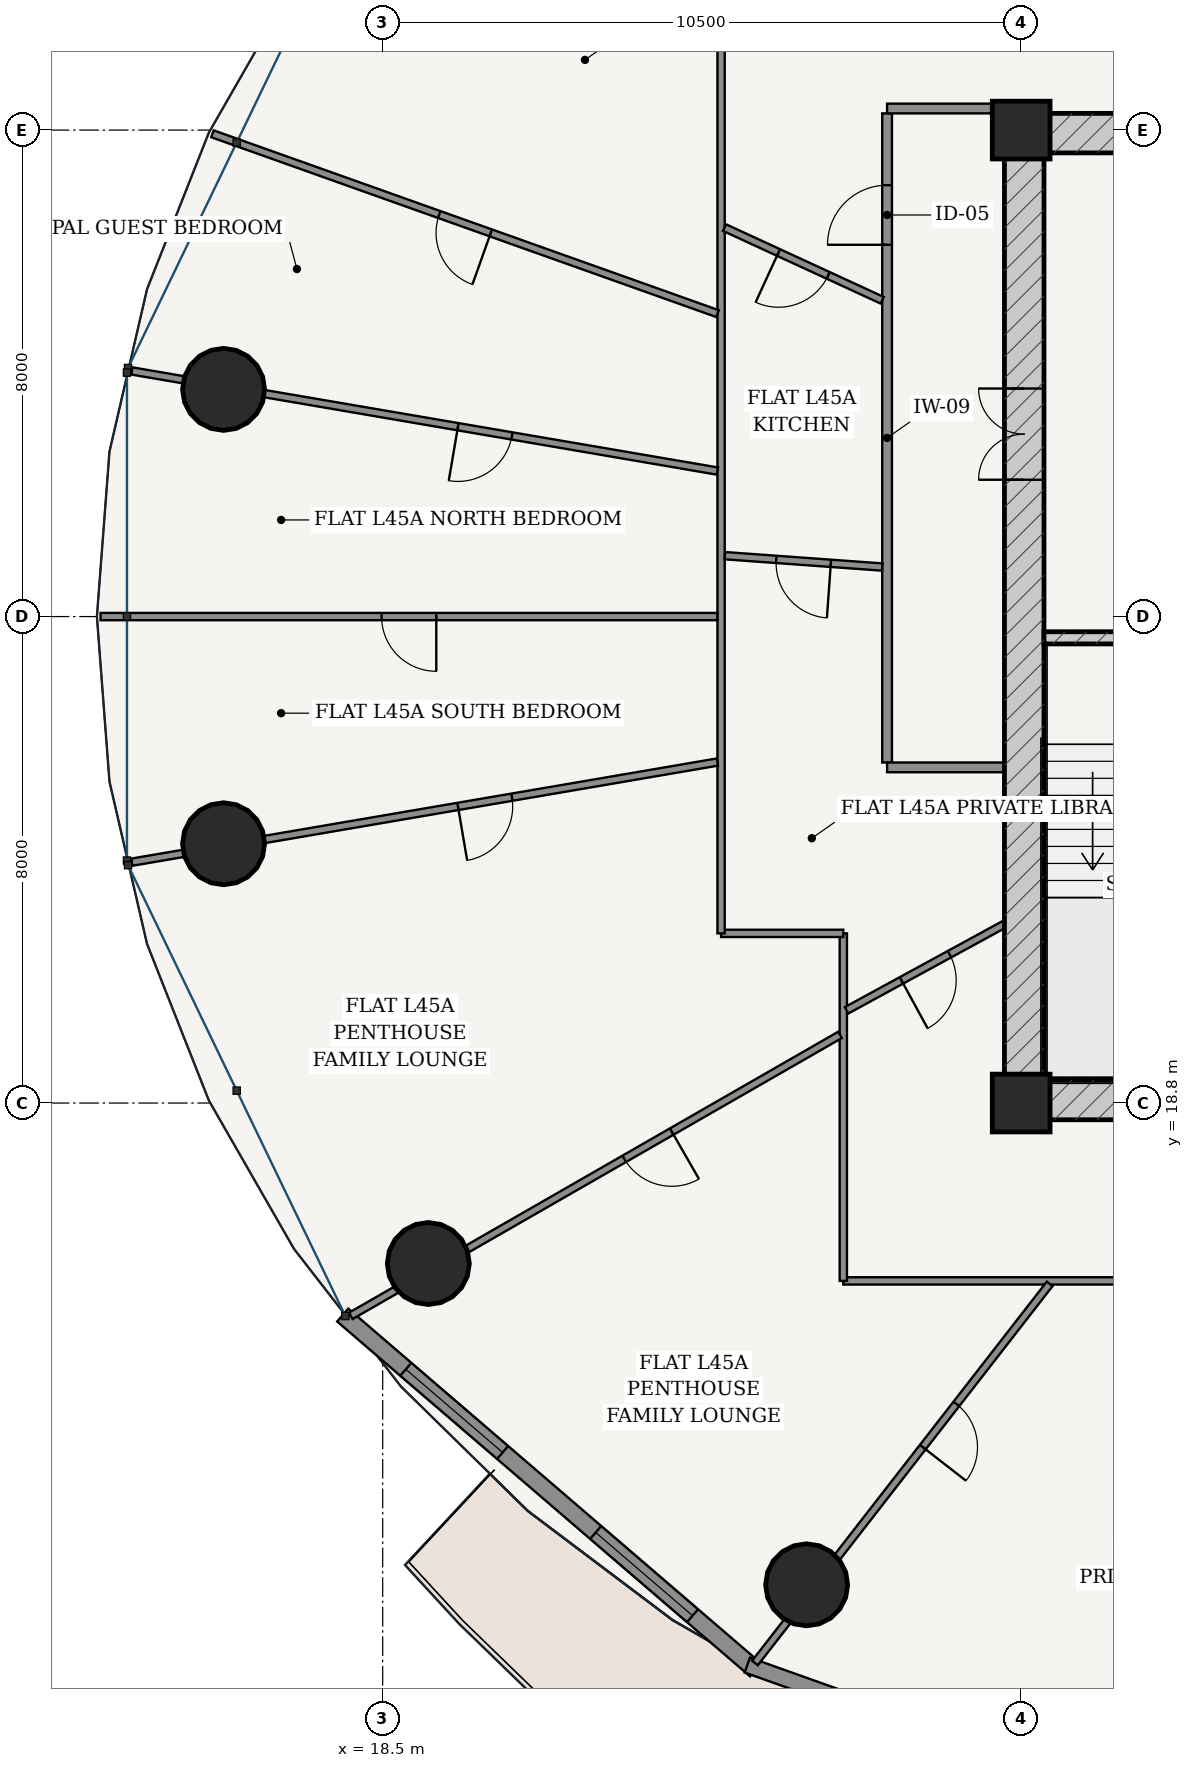
"""IFC4 building model, lengths in metres.
Left out: names, types, materials, properties, quantities, classifications, styles, units other than length and angle.
Written with IfcOpenShell. Run it as: python <this file> out.ifc"""

import sys

from ifc_helpers import new_model, si_unit, direction, frame, frame_2d, origin, origin_2d, place, context, subcontext, project, spatial, rectangle, hollow_circle, extrude, source, transform, mapped, element, fill, save


model = new_model("IFC4")
c1 = context("Model", 3, precision=1e-05, world=origin(), true_north=direction((-0.2419218956, 0.970295726276)))
c2 = subcontext(c1, "Body", "Model", "MODEL_VIEW")
j1 = project(units=[si_unit("LENGTHUNIT", "METRE"), si_unit("PLANEANGLEUNIT", "RADIAN")], contexts=[c1])
p1 = place(None, origin())
s1 = spatial("IfcSite", under=j1, at=p1, CompositionType="ELEMENT")
p2 = place(p1, origin())
s2 = spatial("IfcBuilding", under=s1, at=p2, CompositionType="ELEMENT")
p3 = place(p2, frame((0.0, 0.0, 171.4)))
s3 = spatial("IfcBuildingStorey", under=s2, at=p3, CompositionType="ELEMENT", Elevation=171.4)
for number, where, z_axis, x_axis in (
    (1, (29.0, 18.8, 0.0), (0.0, 0.0, 1.0), (1.0, 0.0, 0.0)),
    (2, (29.0, 34.8, 0.0), (0.0, 0.0, 1.0), (1.0, 0.0, 0.0)),
):
    element("IfcColumn", number, at=place(p3, frame(where, z_axis=z_axis, x_axis=x_axis)), inside=s3, PredefinedType="COLUMN", context=c2, shape_type="SweptSolid", body=[
        extrude(rectangle(XDim=0.95, YDim=0.95, at=origin_2d()), origin(), (0.0, 0.0, 1.0), 3.6),
    ])
p4 = place(p3, frame((28.725, 18.85, 0.0), z_axis=(0.0, 0.0, 1.0), x_axis=(1.0, 0.0, 0.0)))
e3 = element("IfcWall", 3, at=p4, inside=s3, PredefinedType="SHEAR", context=c2, shape_type="SweptSolid", body=[
    extrude(rectangle(XDim=18.55, YDim=0.65, at=frame_2d((9.275, 0.0))), origin(), (0.0, 0.0, 1.0), 3.33),
])
p5 = place(p4, frame((6.81, 0.0, 0.0)))
e4 = element("IfcOpeningElement", 4, at=p5, cuts=e3, PredefinedType="OPENING", context=c2, shape_type="SweptSolid", body=[
    extrude(rectangle(XDim=0.85, YDim=2.1, at=frame_2d((0.425, 1.05))), frame((0.0, 0.335, 0.0), z_axis=(0.0, -1.0, 0.0), x_axis=(1.0, 0.0, 0.0)), (0.0, 0.0, 1.0), 0.67),
])
p6 = place(p4, frame((8.85, 0.0, 0.0)))
e5 = element("IfcOpeningElement", 5, at=p6, cuts=e3, PredefinedType="OPENING", context=c2, shape_type="SweptSolid", body=[
    extrude(rectangle(XDim=0.85, YDim=2.1, at=frame_2d((0.425, 1.05))), frame((0.0, 0.335, 0.0), z_axis=(0.0, -1.0, 0.0), x_axis=(1.0, 0.0, 0.0)), (0.0, 0.0, 1.0), 0.67),
])
p7 = place(p4, frame((10.89, 0.0, 0.0)))
e6 = element("IfcOpeningElement", 6, at=p7, cuts=e3, PredefinedType="OPENING", context=c2, shape_type="SweptSolid", body=[
    extrude(rectangle(XDim=0.85, YDim=2.1, at=frame_2d((0.425, 1.05))), frame((0.0, 0.335, 0.0), z_axis=(0.0, -1.0, 0.0), x_axis=(1.0, 0.0, 0.0)), (0.0, 0.0, 1.0), 0.67),
])
p8 = place(p3, frame((28.725, 34.75, 0.0), z_axis=(0.0, 0.0, 1.0), x_axis=(1.0, 0.0, 0.0)))
e7 = element("IfcWall", 7, at=p8, inside=s3, PredefinedType="SHEAR", context=c2, shape_type="SweptSolid", body=[
    extrude(rectangle(XDim=18.55, YDim=0.65, at=frame_2d((9.275, 0.0))), origin(), (0.0, 0.0, 1.0), 3.33),
])
p9 = place(p3, frame((29.05, 19.175, 0.0), z_axis=(0.0, 0.0, 1.0), x_axis=(0.0, 1.0, 0.0)))
e8 = element("IfcWall", 8, at=p9, inside=s3, PredefinedType="SHEAR", context=c2, shape_type="SweptSolid", body=[
    extrude(rectangle(XDim=15.25, YDim=0.65, at=frame_2d((7.625, 0.0))), origin(), (0.0, 0.0, 1.0), 3.33),
])
p10 = place(p9, frame((9.875, 0.0, 0.0)))
e9 = element("IfcOpeningElement", 9, at=p10, cuts=e8, PredefinedType="OPENING", context=c2, shape_type="SweptSolid", body=[
    extrude(rectangle(XDim=1.5, YDim=2.2, at=frame_2d((0.75, 1.1))), frame((0.0, 0.335, 0.0), z_axis=(0.0, -1.0, 0.0), x_axis=(1.0, 0.0, 0.0)), (0.0, 0.0, 1.0), 0.67),
])
p11 = place(p3, frame((29.375, 26.45, 0.0), z_axis=(0.0, 0.0, 1.0), x_axis=(1.0, 0.0, 0.0)))
e10 = element("IfcWall", 10, at=p11, inside=s3, PredefinedType="SOLIDWALL", context=c2, shape_type="SweptSolid", body=[
    extrude(rectangle(XDim=3.32, YDim=0.2, at=frame_2d((1.66, 0.0))), origin(), (0.0, 0.0, 1.0), 3.33),
])
p12 = place(p11, frame((1.185, 0.0, 0.0)))
e11 = element("IfcOpeningElement", 11, at=p12, cuts=e10, PredefinedType="OPENING", context=c2, shape_type="SweptSolid", body=[
    extrude(rectangle(XDim=0.95, YDim=2.15, at=frame_2d((0.475, 1.075))), frame((0.0, 0.11, 0.0), z_axis=(0.0, -1.0, 0.0), x_axis=(1.0, 0.0, 0.0)), (0.0, 0.0, 1.0), 0.22),
])
for number, where, z_axis, x_axis in (
    (12, (15.883, 30.536, 0.0), (0.0, 0.0, 1.0), (1.0, 0.0, 0.0)),
    (13, (15.883, 23.064, 0.0), (0.0, 0.0, 1.0), (1.0, 0.0, 0.0)),
    (14, (19.25, 16.161, 0.0), (0.0, 0.0, 1.0), (1.0, 0.0, 0.0)),
    (15, (25.472, 10.877, 0.0), (0.0, 0.0, 1.0), (1.0, 0.0, 0.0)),
):
    element("IfcColumn", number, at=place(p3, frame(where, z_axis=z_axis, x_axis=x_axis)), inside=s3, PredefinedType="COLUMN", context=c2, shape_type="SweptSolid", body=[
        extrude(hollow_circle(Radius=0.675, WallThickness=0.042, at=origin_2d()), origin(), (0.0, 0.0, 1.0), 3.6),
    ])
p13 = place(p3, frame((17.843, 15.313, 0.0), z_axis=(0.0, 0.0, 1.0), x_axis=(0.75843401647, -0.651749831348, 0.0)))
e16 = element("IfcWall", 16, at=p13, inside=s3, PredefinedType="SOLIDWALL", context=c2, shape_type="SweptSolid", body=[
    extrude(rectangle(XDim=8.952, YDim=0.28, at=frame_2d((4.476, 0.0))), origin(), (0.0, 0.0, 1.0), 3.33),
])
p14 = place(p13, frame((1.367, 0.0, 0.85)))
e17 = element("IfcOpeningElement", 17, at=p14, cuts=e16, PredefinedType="OPENING", context=c2, shape_type="SweptSolid", body=[
    extrude(rectangle(XDim=2.1, YDim=1.95, at=frame_2d((1.05, 0.975))), frame((0.0, 0.15, 0.0), z_axis=(0.0, -1.0, 0.0), x_axis=(1.0, 0.0, 0.0)), (0.0, 0.0, 1.0), 0.3),
])
p15 = place(p13, frame((5.485, 0.0, 0.85)))
e18 = element("IfcOpeningElement", 18, at=p15, cuts=e16, PredefinedType="OPENING", context=c2, shape_type="SweptSolid", body=[
    extrude(rectangle(XDim=2.1, YDim=1.95, at=frame_2d((1.05, 0.975))), frame((0.0, 0.15, 0.0), z_axis=(0.0, -1.0, 0.0), x_axis=(1.0, 0.0, 0.0)), (0.0, 0.0, 1.0), 0.3),
])
p16 = place(p3, frame((24.497, 9.557, 0.0), z_axis=(0.0, 0.0, 1.0), x_axis=(0.942103604331, -0.335321932934, 0.0)))
e19 = element("IfcWall", 19, at=p16, inside=s3, PredefinedType="SOLIDWALL", context=c2, shape_type="SweptSolid", body=[
    extrude(rectangle(XDim=9.408, YDim=0.26, at=frame_2d((4.704, 0.0))), origin(), (0.0, 0.0, 1.0), 3.33),
])
p17 = place(p16, frame((4.029, 0.0, 0.0)))
e20 = element("IfcOpeningElement", 20, at=p17, cuts=e19, PredefinedType="OPENING", context=c2, shape_type="SweptSolid", body=[
    extrude(rectangle(XDim=1.35, YDim=2.2, at=frame_2d((0.675, 1.1))), frame((0.0, 0.14, 0.0), z_axis=(0.0, -1.0, 0.0), x_axis=(1.0, 0.0, 0.0)), (0.0, 0.0, 1.0), 0.28),
])
p18 = place(p3, frame((26.795, 24.4, 0.0), z_axis=(0.0, 0.0, 1.0), x_axis=(0.0, 1.0, 0.0)))
e21 = element("IfcWall", 21, at=p18, inside=s3, PredefinedType="PARTITIONING", context=c2, shape_type="SweptSolid", body=[
    extrude(rectangle(XDim=10.675, YDim=0.16, at=frame_2d((5.337, 0.0))), origin(), (0.0, 0.0, 1.0), 2.776),
])
p19 = place(p18, frame((8.514, 0.0, 0.0)))
e22 = element("IfcOpeningElement", 22, at=p19, cuts=e21, PredefinedType="OPENING", context=c2, shape_type="SweptSolid", body=[
    extrude(rectangle(XDim=0.98, YDim=2.2, at=frame_2d((0.49, 1.1))), frame((0.0, 0.09, 0.0), z_axis=(0.0, -1.0, 0.0), x_axis=(1.0, 0.0, 0.0)), (0.0, 0.0, 1.0), 0.18),
])
p20 = place(p3, frame((26.795, 35.155, 0.0), z_axis=(0.0, 0.0, 1.0), x_axis=(1.0, 0.0, 0.0)))
e23 = element("IfcWall", 23, at=p20, inside=s3, PredefinedType="PARTITIONING", context=c2, shape_type="SweptSolid", body=[
    extrude(rectangle(XDim=1.93, YDim=0.16, at=frame_2d((0.965, 0.0))), origin(), (0.0, 0.0, 1.0), 2.776),
])
p21 = place(p3, frame((26.795, 24.32, 0.0), z_axis=(0.0, 0.0, 1.0), x_axis=(1.0, 0.0, 0.0)))
e24 = element("IfcWall", 24, at=p21, inside=s3, PredefinedType="PARTITIONING", context=c2, shape_type="SweptSolid", body=[
    extrude(rectangle(XDim=1.93, YDim=0.16, at=frame_2d((0.965, 0.0))), origin(), (0.0, 0.0, 1.0), 3.33),
])
p22 = place(p3, frame((31.59, 15.875, 0.0), z_axis=(0.0, 0.0, 1.0), x_axis=(-1.0, 0.0, 0.0)))
e25 = element("IfcWall", 25, at=p22, inside=s3, PredefinedType="PARTITIONING", context=c2, shape_type="SweptSolid", body=[
    extrude(rectangle(XDim=5.515, YDim=0.12, at=frame_2d((2.758, 0.0))), origin(), (0.0, 0.0, 1.0), 2.776),
])
p23 = place(p3, frame((26.075, 15.875, 0.0), z_axis=(0.0, 0.0, 1.0), x_axis=(0.0, 1.0, 0.0)))
e26 = element("IfcWall", 26, at=p23, inside=s3, PredefinedType="PARTITIONING", context=c2, shape_type="SweptSolid", body=[
    extrude(rectangle(XDim=5.715, YDim=0.12, at=frame_2d((2.857, 0.0))), origin(), (0.0, 0.0, 1.0), 2.776),
])
p24 = place(p3, frame((26.075, 21.59, 0.0), z_axis=(0.0, 0.0, 1.0), x_axis=(-1.0, 0.0, 0.0)))
e27 = element("IfcWall", 27, at=p24, inside=s3, PredefinedType="PARTITIONING", context=c2, shape_type="SweptSolid", body=[
    extrude(rectangle(XDim=2.01, YDim=0.12, at=frame_2d((1.005, 0.0))), origin(), (0.0, 0.0, 1.0), 3.33),
])
p25 = place(p3, frame((24.065, 21.59, 0.0), z_axis=(0.0, 0.0, 1.0), x_axis=(0.0, 1.0, 0.0)))
e28 = element("IfcWall", 28, at=p25, inside=s3, PredefinedType="PARTITIONING", context=c2, shape_type="SweptSolid", body=[
    extrude(rectangle(XDim=16.295, YDim=0.12, at=frame_2d((8.147, 0.0))), origin(), (0.0, 0.0, 1.0), 2.776),
])
p26 = place(p3, frame((24.007, 31.782, 0.0), z_axis=(0.0, 0.0, 1.0), x_axis=(-0.942077868165, 0.335394231187, 0.0)))
e29 = element("IfcWall", 29, at=p26, inside=s3, PredefinedType="PARTITIONING", context=c2, shape_type="SweptSolid", body=[
    extrude(rectangle(XDim=8.817, YDim=0.12, at=frame_2d((4.408, 0.0))), origin(), (0.0, 0.0, 1.0), 2.846),
])
p27 = place(p26, frame((3.958, 0.0, 0.0)))
e30 = element("IfcOpeningElement", 30, at=p27, cuts=e29, PredefinedType="OPENING", context=c2, shape_type="SweptSolid", body=[
    extrude(rectangle(XDim=0.9, YDim=2.15, at=frame_2d((0.45, 1.075))), frame((0.0, 0.07, 0.0), z_axis=(0.0, -1.0, 0.0), x_axis=(1.0, 0.0, 0.0)), (0.0, 0.0, 1.0), 0.14),
])
p28 = place(p3, frame((24.004, 29.193, 0.0), z_axis=(0.0, 0.0, 1.0), x_axis=(-0.985698378271, 0.168519159369, 0.0)))
e31 = element("IfcWall", 31, at=p28, inside=s3, PredefinedType="PARTITIONING", context=c2, shape_type="SweptSolid", body=[
    extrude(rectangle(XDim=9.769, YDim=0.12, at=frame_2d((4.884, 0.0))), origin(), (0.0, 0.0, 1.0), 2.776),
])
p29 = place(p28, frame((3.428, 0.0, 0.0)))
e32 = element("IfcOpeningElement", 32, at=p29, cuts=e31, PredefinedType="OPENING", context=c2, shape_type="SweptSolid", body=[
    extrude(rectangle(XDim=0.9, YDim=2.15, at=frame_2d((0.45, 1.075))), frame((0.0, 0.07, 0.0), z_axis=(0.0, -1.0, 0.0), x_axis=(1.0, 0.0, 0.0)), (0.0, 0.0, 1.0), 0.14),
])
p30 = place(p3, frame((24.003, 26.8, 0.0), z_axis=(0.0, 0.0, 1.0), x_axis=(-1.0, 0.0, 0.0)))
e33 = element("IfcWall", 33, at=p30, inside=s3, PredefinedType="PARTITIONING", context=c2, shape_type="SweptSolid", body=[
    extrude(rectangle(XDim=10.143, YDim=0.12, at=frame_2d((5.071, 0.0))), origin(), (0.0, 0.0, 1.0), 2.846),
])
p31 = place(p30, frame((4.622, 0.0, 0.0)))
e34 = element("IfcOpeningElement", 34, at=p31, cuts=e33, PredefinedType="OPENING", context=c2, shape_type="SweptSolid", body=[
    extrude(rectangle(XDim=0.9, YDim=2.15, at=frame_2d((0.45, 1.075))), frame((0.0, 0.07, 0.0), z_axis=(0.0, -1.0, 0.0), x_axis=(1.0, 0.0, 0.0)), (0.0, 0.0, 1.0), 0.14),
])
p32 = place(p3, frame((24.004, 24.407, 0.0), z_axis=(0.0, 0.0, 1.0), x_axis=(-0.985698378271, -0.168519159369, 0.0)))
e35 = element("IfcWall", 35, at=p32, inside=s3, PredefinedType="PARTITIONING", context=c2, shape_type="SweptSolid", body=[
    extrude(rectangle(XDim=9.769, YDim=0.12, at=frame_2d((4.884, 0.0))), origin(), (0.0, 0.0, 1.0), 2.776),
])
p33 = place(p32, frame((3.428, 0.0, 0.0)))
e36 = element("IfcOpeningElement", 36, at=p33, cuts=e35, PredefinedType="OPENING", context=c2, shape_type="SweptSolid", body=[
    extrude(rectangle(XDim=0.9, YDim=2.15, at=frame_2d((0.45, 1.075))), frame((0.0, 0.07, 0.0), z_axis=(0.0, -1.0, 0.0), x_axis=(1.0, 0.0, 0.0)), (0.0, 0.0, 1.0), 0.14),
])
p34 = place(p3, frame((26.021, 19.921, 0.0), z_axis=(0.0, 0.0, 1.0), x_axis=(-0.867161148693, -0.498027652041, 0.0)))
e37 = element("IfcWall", 37, at=p34, inside=s3, PredefinedType="PARTITIONING", context=c2, shape_type="SweptSolid", body=[
    extrude(rectangle(XDim=9.279, YDim=0.12, at=frame_2d((4.64, 0.0))), origin(), (0.0, 0.0, 1.0), 2.776),
])
p35 = place(p34, frame((3.192, 0.0, 0.0)))
e38 = element("IfcOpeningElement", 38, at=p35, cuts=e37, PredefinedType="OPENING", context=c2, shape_type="SweptSolid", body=[
    extrude(rectangle(XDim=0.9, YDim=2.15, at=frame_2d((0.45, 1.075))), frame((0.0, 0.07, 0.0), z_axis=(0.0, -1.0, 0.0), x_axis=(1.0, 0.0, 0.0)), (0.0, 0.0, 1.0), 0.14),
])
p36 = place(p3, frame((29.469, 15.826, 0.0), z_axis=(0.0, 0.0, 1.0), x_axis=(-0.61373942367, -0.789508657225, 0.0)))
e39 = element("IfcWall", 39, at=p36, inside=s3, PredefinedType="PARTITIONING", context=c2, shape_type="SweptSolid", body=[
    extrude(rectangle(XDim=7.898, YDim=0.12, at=frame_2d((3.949, 0.0))), origin(), (0.0, 0.0, 1.0), 2.776),
])
p37 = place(p36, frame((2.5, 0.0, 0.0)))
e40 = element("IfcOpeningElement", 40, at=p37, cuts=e39, PredefinedType="OPENING", context=c2, shape_type="SweptSolid", body=[
    extrude(rectangle(XDim=0.9, YDim=2.15, at=frame_2d((0.45, 1.075))), frame((0.0, 0.07, 0.0), z_axis=(0.0, -1.0, 0.0), x_axis=(1.0, 0.0, 0.0)), (0.0, 0.0, 1.0), 0.14),
])
p38 = place(p3, frame((26.715, 32.001, 0.0), z_axis=(0.0, 0.0, 1.0), x_axis=(-0.90819942915, 0.418537688735, 0.0)))
e41 = element("IfcWall", 41, at=p38, inside=s3, PredefinedType="PARTITIONING", context=c2, shape_type="SweptSolid", body=[
    extrude(rectangle(XDim=2.856, YDim=0.12, at=frame_2d((1.428, 0.0))), origin(), (0.0, 0.0, 1.0), 3.33),
])
p39 = place(p38, frame((0.978, 0.0, 0.0)))
e42 = element("IfcOpeningElement", 42, at=p39, cuts=e41, PredefinedType="OPENING", context=c2, shape_type="SweptSolid", body=[
    extrude(rectangle(XDim=0.9, YDim=2.15, at=frame_2d((0.45, 1.075))), frame((0.0, 0.07, 0.0), z_axis=(0.0, -1.0, 0.0), x_axis=(1.0, 0.0, 0.0)), (0.0, 0.0, 1.0), 0.14),
])
p40 = place(p3, frame((26.715, 27.615, 0.0), z_axis=(0.0, 0.0, 1.0), x_axis=(-0.997406375801, 0.071975839778, 0.0)))
e43 = element("IfcWall", 43, at=p40, inside=s3, PredefinedType="PARTITIONING", context=c2, shape_type="SweptSolid", body=[
    extrude(rectangle(XDim=2.595, YDim=0.12, at=frame_2d((1.297, 0.0))), origin(), (0.0, 0.0, 1.0), 3.33),
])
p41 = place(p40, frame((0.847, 0.0, 0.0)))
e44 = element("IfcOpeningElement", 44, at=p41, cuts=e43, PredefinedType="OPENING", context=c2, shape_type="SweptSolid", body=[
    extrude(rectangle(XDim=0.9, YDim=2.15, at=frame_2d((0.45, 1.075))), frame((0.0, 0.07, 0.0), z_axis=(0.0, -1.0, 0.0), x_axis=(1.0, 0.0, 0.0)), (0.0, 0.0, 1.0), 0.14),
])
p42 = place(p3, frame((28.723, 21.74, 0.0), z_axis=(0.0, 0.0, 1.0), x_axis=(-0.877892414948, -0.47885792024, 0.0)))
e45 = element("IfcWall", 45, at=p42, inside=s3, PredefinedType="PARTITIONING", context=c2, shape_type="SweptSolid", body=[
    extrude(rectangle(XDim=2.955, YDim=0.12, at=frame_2d((1.477, 0.0))), origin(), (0.0, 0.0, 1.0), 3.33),
])
p43 = place(p42, frame((1.027, 0.0, 0.0)))
e46 = element("IfcOpeningElement", 46, at=p43, cuts=e45, PredefinedType="OPENING", context=c2, shape_type="SweptSolid", body=[
    extrude(rectangle(XDim=0.9, YDim=2.15, at=frame_2d((0.45, 1.075))), frame((0.0, 0.07, 0.0), z_axis=(0.0, -1.0, 0.0), x_axis=(1.0, 0.0, 0.0)), (0.0, 0.0, 1.0), 0.14),
])
m1 = source(origin(), c2, "Body", "SweptSolid", [
    extrude(rectangle(XDim=2.1, YDim=1.95, at=frame_2d((1.05, 0.975))), frame((0.0, 0.03, 0.0), z_axis=(0.0, -1.0, 0.0), x_axis=(1.0, 0.0, 0.0)), (0.0, 0.0, 1.0), 0.06),
])
p44 = place(p14, origin())
e47 = element("IfcWindow", 47, at=p44, inside=s3, PartitioningType="SINGLE_PANEL", PredefinedType="WINDOW", context=c2, shape_type="MappedRepresentation", body=[
    mapped(m1, transform((0.0, 0.0, 0.0), scale=1.0)),
])
fill(e17, e47)
p45 = place(p15, origin())
e48 = element("IfcWindow", 48, at=p45, inside=s3, PartitioningType="SINGLE_PANEL", PredefinedType="WINDOW", context=c2, shape_type="MappedRepresentation", body=[
    mapped(m1, transform((0.0, 0.0, 0.0), scale=1.0)),
])
fill(e18, e48)
m2 = source(origin(), c2, "Body", "SweptSolid", [
    extrude(rectangle(XDim=1.5, YDim=2.2, at=frame_2d((0.75, 1.1))), frame((0.0, 0.025, 0.0), z_axis=(0.0, -1.0, 0.0), x_axis=(1.0, 0.0, 0.0)), (0.0, 0.0, 1.0), 0.05),
])
p46 = place(p10, origin())
e49 = element("IfcDoor", 49, at=p46, inside=s3, OperationType="DOUBLE_DOOR_SINGLE_SWING", PredefinedType="DOOR", context=c2, shape_type="MappedRepresentation", body=[
    mapped(m2, transform((0.0, 0.0, 0.0), scale=1.0)),
])
fill(e9, e49)
m3 = source(origin(), c2, "Body", "SweptSolid", [
    extrude(rectangle(XDim=0.98, YDim=2.2, at=frame_2d((0.49, 1.1))), frame((0.0, 0.025, 0.0), z_axis=(0.0, -1.0, 0.0), x_axis=(1.0, 0.0, 0.0)), (0.0, 0.0, 1.0), 0.05),
])
p47 = place(p19, origin())
e50 = element("IfcDoor", 50, at=p47, inside=s3, OperationType="SINGLE_SWING_LEFT", PredefinedType="DOOR", context=c2, shape_type="MappedRepresentation", body=[
    mapped(m3, transform((0.0, 0.0, 0.0), scale=1.0)),
])
fill(e22, e50)
m4 = source(origin(), c2, "Body", "SweptSolid", [
    extrude(rectangle(XDim=0.9, YDim=2.15, at=frame_2d((0.45, 1.075))), frame((0.0, 0.025, 0.0), z_axis=(0.0, -1.0, 0.0), x_axis=(1.0, 0.0, 0.0)), (0.0, 0.0, 1.0), 0.05),
])
p48 = place(p39, origin())
e51 = element("IfcDoor", 51, at=p48, inside=s3, OperationType="SINGLE_SWING_RIGHT", PredefinedType="DOOR", context=c2, shape_type="MappedRepresentation", body=[
    mapped(m4, transform((0.0, 0.0, 0.0), scale=1.0)),
])
fill(e42, e51)
p49 = place(p41, origin())
e52 = element("IfcDoor", 52, at=p49, inside=s3, OperationType="SINGLE_SWING_LEFT", PredefinedType="DOOR", context=c2, shape_type="MappedRepresentation", body=[
    mapped(m4, transform((0.0, 0.0, 0.0), scale=1.0)),
])
fill(e44, e52)
p50 = place(p43, origin())
e53 = element("IfcDoor", 53, at=p50, inside=s3, OperationType="SINGLE_SWING_RIGHT", PredefinedType="DOOR", context=c2, shape_type="MappedRepresentation", body=[
    mapped(m4, transform((0.0, 0.0, 0.0), scale=1.0)),
])
fill(e46, e53)
p51 = place(p27, origin())
e54 = element("IfcDoor", 54, at=p51, inside=s3, OperationType="SINGLE_SWING_LEFT", PredefinedType="DOOR", context=c2, shape_type="MappedRepresentation", body=[
    mapped(m4, transform((0.0, 0.0, 0.0), scale=1.0)),
])
fill(e30, e54)
p52 = place(p29, origin())
e55 = element("IfcDoor", 55, at=p52, inside=s3, OperationType="SINGLE_SWING_RIGHT", PredefinedType="DOOR", context=c2, shape_type="MappedRepresentation", body=[
    mapped(m4, transform((0.0, 0.0, 0.0), scale=1.0)),
])
fill(e32, e55)
p53 = place(p31, origin())
e56 = element("IfcDoor", 56, at=p53, inside=s3, OperationType="SINGLE_SWING_LEFT", PredefinedType="DOOR", context=c2, shape_type="MappedRepresentation", body=[
    mapped(m4, transform((0.0, 0.0, 0.0), scale=1.0)),
])
fill(e34, e56)
p54 = place(p33, origin())
e57 = element("IfcDoor", 57, at=p54, inside=s3, OperationType="SINGLE_SWING_RIGHT", PredefinedType="DOOR", context=c2, shape_type="MappedRepresentation", body=[
    mapped(m4, transform((0.0, 0.0, 0.0), scale=1.0)),
])
fill(e36, e57)
p55 = place(p35, origin())
e58 = element("IfcDoor", 58, at=p55, inside=s3, OperationType="SINGLE_SWING_LEFT", PredefinedType="DOOR", context=c2, shape_type="MappedRepresentation", body=[
    mapped(m4, transform((0.0, 0.0, 0.0), scale=1.0)),
])
fill(e38, e58)
p56 = place(p37, origin())
e59 = element("IfcDoor", 59, at=p56, inside=s3, OperationType="SINGLE_SWING_RIGHT", PredefinedType="DOOR", context=c2, shape_type="MappedRepresentation", body=[
    mapped(m4, transform((0.0, 0.0, 0.0), scale=1.0)),
])
fill(e40, e59)
save(model, sys.argv[1])
